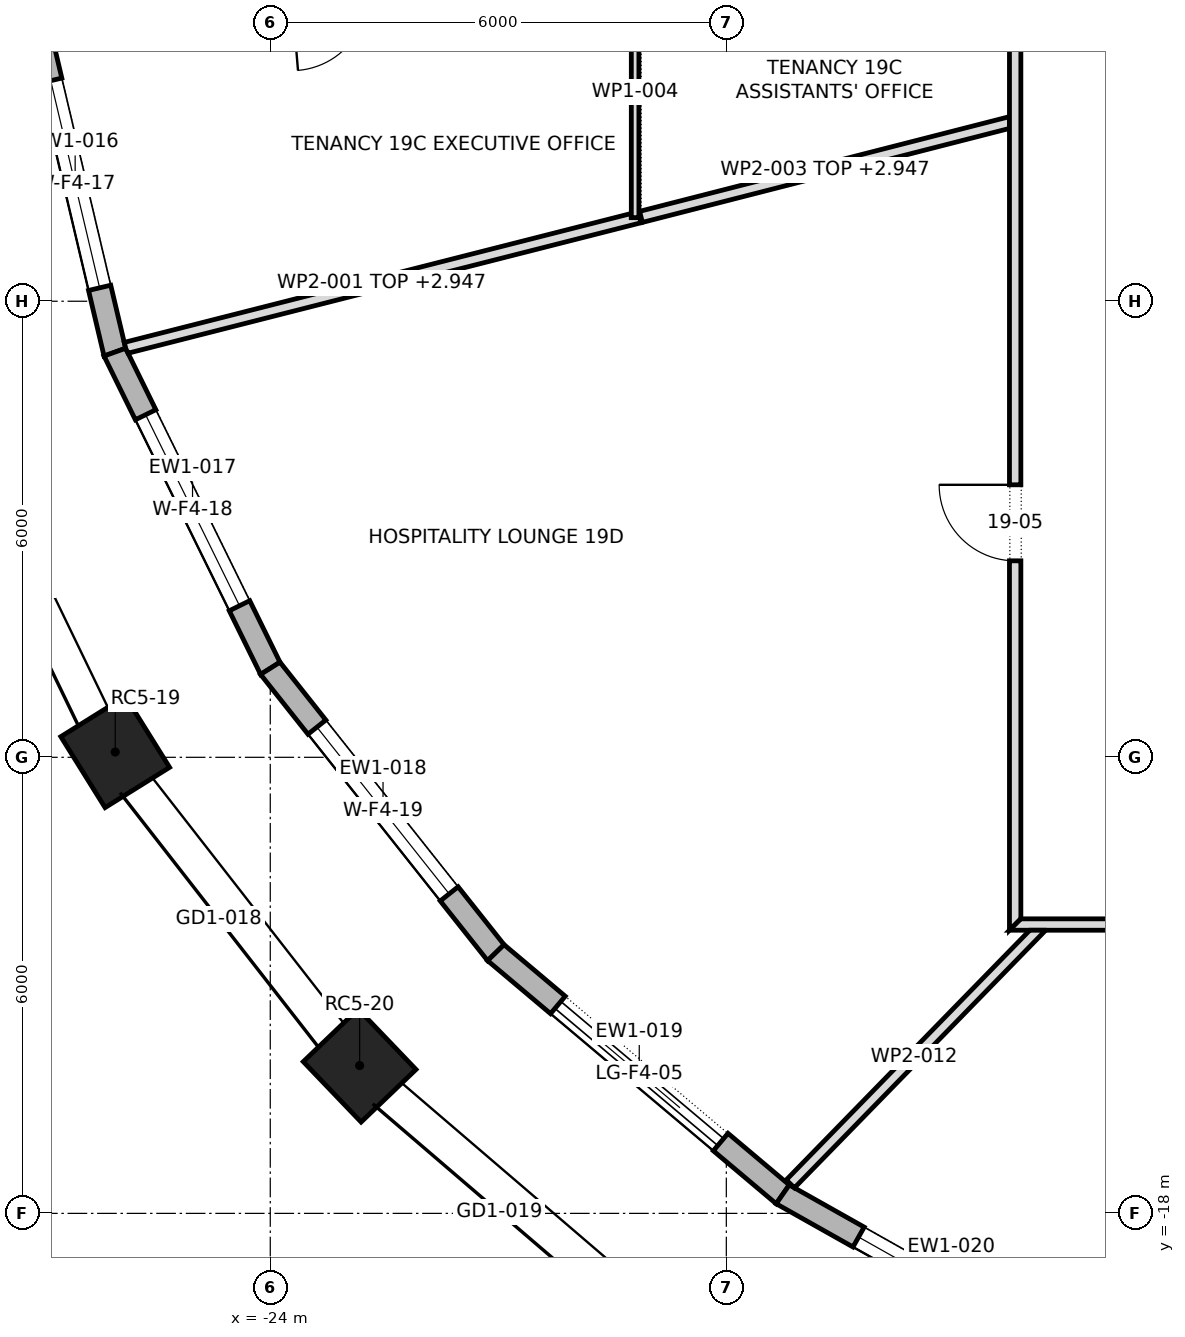
"""IFC4 building model, lengths in metres.
Left out: names, types, materials, properties, quantities, classifications, styles, units other than length and angle.
Written with IfcOpenShell. Run it as: python <this file> out.ifc"""

import sys

from ifc_helpers import new_model, si_unit, direction, frame, frame_2d, origin, origin_2d, place, context, subcontext, project, spatial, polyline, rectangle, outline, extrude, element, fill, save


model = new_model("IFC4")
c1 = context("Model", 3, precision=1e-05, world=origin(), true_north=direction((0.0, 1.0)))
c2 = subcontext(c1, "Body", "Model", "MODEL_VIEW")
j1 = project(units=[si_unit("LENGTHUNIT", "METRE"), si_unit("PLANEANGLEUNIT", "RADIAN")], contexts=[c1])
p1 = place(None, origin())
s1 = spatial("IfcSite", under=j1, at=p1, CompositionType="ELEMENT")
p2 = place(p1, origin())
s2 = spatial("IfcBuilding", under=s1, at=p2, CompositionType="ELEMENT")
p3 = place(p2, frame((0.0, 0.0, 276.3)))
s3 = spatial("IfcBuildingStorey", under=s2, at=p3, CompositionType="ELEMENT", Elevation=276.3)
for number, where, z_axis, x_axis in (
    (1, (-26.04, -11.93, 0.0), (0.0, 0.0, 1.0), (0.529, -0.849, 0.0)),
    (2, (-22.824, -16.055, 0.0), (0.0, 0.0, 1.0), (0.692, -0.722, 0.0)),
):
    element("IfcColumn", number, at=place(p3, frame(where, z_axis=z_axis, x_axis=x_axis)), inside=s3, PredefinedType="COLUMN", context=c2, shape_type="SweptSolid", body=[
        extrude(rectangle(XDim=1.1, YDim=1.0, at=origin_2d()), origin(), (0.0, 0.0, 1.0), 4.0),
    ])
p4 = place(p3, frame((-27.088, -2.252, 0.0), z_axis=(0.0, 0.0, 1.0), x_axis=(0.22983372436, -0.973229910734, 0.0)))
e3 = element("IfcWall", 3, at=p4, inside=s3, PredefinedType="STANDARD", context=c2, shape_type="SweptSolid", body=[
    extrude(outline(polyline([(-0.018, -0.15), (4.556, -0.15), (4.522, 0.15), (0.018, 0.15), (-0.018, -0.15)])), origin(), (0.0, 0.0, 1.0), 3.7),
])
p5 = place(p4, frame((0.869, 0.0, 0.6)))
e4 = element("IfcOpeningElement", 4, at=p5, cuts=e3, PredefinedType="OPENING", context=c2, shape_type="SweptSolid", body=[
    extrude(rectangle(XDim=2.8, YDim=2.65, at=frame_2d((1.4, 1.325))), frame((0.0, 0.162, 0.0), z_axis=(0.0, -1.0, 0.0), x_axis=(1.0, 0.0, 0.0)), (0.0, 0.0, 1.0), 0.324),
])
p6 = place(p3, frame((-26.045, -6.67, 0.0), z_axis=(0.0, 0.0, 1.0), x_axis=(0.441261940724, -0.897378348117, 0.0)))
e5 = element("IfcWall", 5, at=p6, inside=s3, PredefinedType="STANDARD", context=c2, shape_type="SweptSolid", body=[
    extrude(outline(polyline([(-0.017, -0.15), (4.651, -0.15), (4.619, 0.15), (0.017, 0.15), (-0.017, -0.15)])), origin(), (0.0, 0.0, 1.0), 3.7),
])
p7 = place(p6, frame((0.917, 0.0, 0.6)))
e6 = element("IfcOpeningElement", 6, at=p7, cuts=e5, PredefinedType="OPENING", context=c2, shape_type="SweptSolid", body=[
    extrude(rectangle(XDim=2.8, YDim=2.65, at=frame_2d((1.4, 1.325))), frame((0.0, 0.162, 0.0), z_axis=(0.0, -1.0, 0.0), x_axis=(1.0, 0.0, 0.0)), (0.0, 0.0, 1.0), 0.324),
])
p8 = place(p3, frame((-24.0, -10.829, 0.0), z_axis=(0.0, 0.0, 1.0), x_axis=(0.621434755851, -0.783465917715, 0.0)))
e7 = element("IfcWall", 7, at=p8, inside=s3, PredefinedType="STANDARD", context=c2, shape_type="SweptSolid", body=[
    extrude(outline(polyline([(-0.016, -0.15), (4.79, -0.15), (4.76, 0.15), (0.016, 0.15), (-0.016, -0.15)])), origin(), (0.0, 0.0, 1.0), 3.7),
])
p9 = place(p8, frame((0.987, 0.0, 0.6)))
e8 = element("IfcOpeningElement", 8, at=p9, cuts=e7, PredefinedType="OPENING", context=c2, shape_type="SweptSolid", body=[
    extrude(rectangle(XDim=2.8, YDim=2.65, at=frame_2d((1.4, 1.325))), frame((0.0, 0.162, 0.0), z_axis=(0.0, -1.0, 0.0), x_axis=(1.0, 0.0, 0.0)), (0.0, 0.0, 1.0), 0.324),
])
p10 = place(p3, frame((-21.032, -14.57, 0.0), z_axis=(0.0, 0.0, 1.0), x_axis=(0.764832940795, -0.644228664897, 0.0)))
e9 = element("IfcWall", 9, at=p10, inside=s3, PredefinedType="STANDARD", context=c2, shape_type="SweptSolid", body=[
    extrude(outline(polyline([(-0.015, -0.15), (4.949, -0.15), (4.921, 0.15), (0.015, 0.15), (-0.015, -0.15)])), origin(), (0.0, 0.0, 1.0), 3.7),
])
p11 = place(p10, frame((1.068, 0.0, 0.0)))
e10 = element("IfcOpeningElement", 10, at=p11, cuts=e9, PredefinedType="OPENING", context=c2, shape_type="SweptSolid", body=[
    extrude(rectangle(XDim=2.8, YDim=3.25, at=frame_2d((1.4, 1.625))), frame((0.0, 0.162, 0.0), z_axis=(0.0, -1.0, 0.0), x_axis=(1.0, 0.0, 0.0)), (0.0, 0.0, 1.0), 0.324),
])
p12 = place(p3, frame((-17.258, -17.75, 0.0), z_axis=(0.0, 0.0, 1.0), x_axis=(0.871433320402, -0.490513983585, 0.0)))
e11 = element("IfcWall", 11, at=p12, inside=s3, PredefinedType="STANDARD", context=c2, shape_type="SweptSolid", body=[
    extrude(outline(polyline([(-0.014, -0.15), (5.104, -0.15), (5.077, 0.15), (0.014, 0.15), (-0.014, -0.15)])), origin(), (0.0, 0.0, 1.0), 3.7),
])
p13 = place(p12, frame((1.145, 0.0, 0.6)))
e12 = element("IfcOpeningElement", 12, at=p13, cuts=e11, PredefinedType="OPENING", context=c2, shape_type="SweptSolid", body=[
    extrude(rectangle(XDim=2.8, YDim=2.65, at=frame_2d((1.4, 1.325))), frame((0.0, 0.162, 0.0), z_axis=(0.0, -1.0, 0.0), x_axis=(1.0, 0.0, 0.0)), (0.0, 0.0, 1.0), 0.324),
])
p14 = place(p3, frame((-25.902, -6.614, 0.0), z_axis=(0.0, 0.0, 1.0), x_axis=(0.969153959709, 0.246456086108, 0.0)))
e13 = element("IfcWall", 13, at=p14, inside=s3, PredefinedType="PARTITIONING", context=c2, shape_type="SweptSolid", body=[
    extrude(outline(polyline([(0.013, -0.075), (1.756, -0.075), (3.5, -0.075), (5.243, -0.075), (6.986, -0.075), (6.986, 0.072), (6.967, -0.003), (6.87, 0.022), (6.883, 0.075), (5.162, 0.075), (3.442, 0.075), (1.721, 0.075), (0.0, 0.075), (0.0, -0.012), (0.013, -0.075)])), origin(), (0.0, 0.0, 1.0), 2.947),
])
p15 = place(p3, frame((-19.132, -4.893, 0.0), z_axis=(0.0, 0.0, 1.0), x_axis=(0.968763144659, 0.247987841537, 0.0)))
e14 = element("IfcWall", 14, at=p15, inside=s3, PredefinedType="PARTITIONING", context=c2, shape_type="SweptSolid", body=[
    extrude(outline(polyline([(0.0, -0.075), (1.665, -0.075), (3.33, -0.075), (4.994, -0.075), (5.033, 0.074), (5.033, 0.075), (3.355, 0.075), (1.678, 0.075), (0.001, 0.075), (0.0, 0.072), (0.0, -0.075)])), origin(), (0.0, 0.0, 1.0), 2.947),
])
p16 = place(p3, frame((-19.2, -4.9, 0.0), z_axis=(0.0, 0.0, 1.0), x_axis=(0.0, 1.0, 0.0)))
e15 = element("IfcWall", 15, at=p16, inside=s3, PredefinedType="PARTITIONING", context=c2, shape_type="SweptSolid", body=[
    extrude(rectangle(XDim=3.31, YDim=0.1, at=frame_2d((1.655, 0.0))), origin(), (0.0, 0.0, 1.0), 3.7),
])
p17 = place(p3, frame((-14.2, -14.275, 0.0), z_axis=(0.0, 0.0, 1.0), x_axis=(0.0, 1.0, 0.0)))
e16 = element("IfcWall", 16, at=p17, inside=s3, PredefinedType="PARTITIONING", context=c2, shape_type="SweptSolid", body=[
    extrude(outline(polyline([(0.15, -0.075), (2.033, -0.075), (3.917, -0.075), (5.8, -0.075), (7.683, -0.075), (9.567, -0.075), (11.45, -0.075), (13.333, -0.075), (15.217, -0.075), (17.1, -0.075), (18.983, -0.075), (20.866, -0.075), (22.75, -0.075), (24.633, -0.075), (26.517, -0.075), (28.4, -0.075), (28.55, 0.075), (28.55, 0.075), (26.646, 0.075), (24.743, 0.075), (22.84, 0.075), (20.937, 0.075), (19.033, 0.075), (17.13, 0.075), (15.227, 0.075), (13.323, 0.075), (11.42, 0.075), (9.517, 0.075), (7.613, 0.075), (5.71, 0.075), (3.807, 0.075), (1.903, 0.075), (0.0, 0.075), (0.15, -0.075)])), origin(), (0.0, 0.0, 1.0), 3.7),
])
p18 = place(p17, frame((20.5, 0.0, 0.0)))
e17 = element("IfcOpeningElement", 17, at=p18, cuts=e16, PredefinedType="OPENING", context=c2, shape_type="SweptSolid", body=[
    extrude(rectangle(XDim=1.0, YDim=2.1, at=frame_2d((0.5, 1.05))), frame((0.0, 0.087, 0.0), z_axis=(0.0, -1.0, 0.0), x_axis=(1.0, 0.0, 0.0)), (0.0, 0.0, 1.0), 0.174),
])
p19 = place(p17, frame((11.595, 0.0, 0.0)))
e18 = element("IfcOpeningElement", 18, at=p19, cuts=e16, PredefinedType="OPENING", context=c2, shape_type="SweptSolid", body=[
    extrude(rectangle(XDim=1.0, YDim=2.1, at=frame_2d((0.5, 1.05))), frame((0.0, 0.087, 0.0), z_axis=(0.0, -1.0, 0.0), x_axis=(1.0, 0.0, 0.0)), (0.0, 0.0, 1.0), 0.174),
])
p20 = place(p17, frame((15.225, 0.0, 0.0)))
e19 = element("IfcOpeningElement", 19, at=p20, cuts=e16, PredefinedType="OPENING", context=c2, shape_type="SweptSolid", body=[
    extrude(rectangle(XDim=1.0, YDim=2.1, at=frame_2d((0.5, 1.05))), frame((0.0, 0.087, 0.0), z_axis=(0.0, -1.0, 0.0), x_axis=(1.0, 0.0, 0.0)), (0.0, 0.0, 1.0), 0.174),
])
p21 = place(p17, frame((4.86, 0.0, 0.0)))
e20 = element("IfcOpeningElement", 20, at=p21, cuts=e16, PredefinedType="OPENING", context=c2, shape_type="SweptSolid", body=[
    extrude(rectangle(XDim=1.0, YDim=2.1, at=frame_2d((0.5, 1.05))), frame((0.0, 0.087, 0.0), z_axis=(0.0, -1.0, 0.0), x_axis=(1.0, 0.0, 0.0)), (0.0, 0.0, 1.0), 0.174),
])
p22 = place(p3, frame((-14.275, -14.2, 0.0), z_axis=(0.0, 0.0, 1.0), x_axis=(1.0, 0.0, 0.0)))
e21 = element("IfcWall", 21, at=p22, inside=s3, PredefinedType="PARTITIONING", context=c2, shape_type="SweptSolid", body=[
    extrude(outline(polyline([(28.55, -0.075), (28.55, -0.075), (28.4, 0.075), (26.517, 0.075), (24.633, 0.075), (22.75, 0.075), (20.866, 0.075), (18.983, 0.075), (17.1, 0.075), (15.217, 0.075), (13.333, 0.075), (11.45, 0.075), (9.567, 0.075), (7.683, 0.075), (5.8, 0.075), (3.917, 0.075), (2.033, 0.075), (0.15, 0.075), (0.0, -0.075), (1.903, -0.075), (3.807, -0.075), (5.71, -0.075), (7.613, -0.075), (9.517, -0.075), (11.42, -0.075), (13.323, -0.075), (15.227, -0.075), (17.13, -0.075), (19.033, -0.075), (20.937, -0.075), (22.84, -0.075), (24.743, -0.075), (26.646, -0.075), (28.55, -0.075)])), origin(), (0.0, 0.0, 1.0), 3.7),
])
p23 = place(p22, frame((4.305, 0.0, 0.0)))
e22 = element("IfcOpeningElement", 22, at=p23, cuts=e21, PredefinedType="OPENING", context=c2, shape_type="SweptSolid", body=[
    extrude(rectangle(XDim=1.0, YDim=2.1, at=frame_2d((0.5, 1.05))), frame((0.0, 0.087, 0.0), z_axis=(0.0, -1.0, 0.0), x_axis=(1.0, 0.0, 0.0)), (0.0, 0.0, 1.0), 0.174),
])
p24 = place(p22, frame((17.735, 0.0, 0.0)))
e23 = element("IfcOpeningElement", 23, at=p24, cuts=e21, PredefinedType="OPENING", context=c2, shape_type="SweptSolid", body=[
    extrude(rectangle(XDim=1.8, YDim=2.1, at=frame_2d((0.9, 1.05))), frame((0.0, 0.087, 0.0), z_axis=(0.0, -1.0, 0.0), x_axis=(1.0, 0.0, 0.0)), (0.0, 0.0, 1.0), 0.174),
])
p25 = place(p3, frame((-13.852, -14.223, 0.0), z_axis=(0.0, 0.0, 1.0), x_axis=(-0.69820654799, -0.715896372629, 0.0)))
e24 = element("IfcWall", 24, at=p25, inside=s3, PredefinedType="PARTITIONING", context=c2, shape_type="SweptSolid", body=[
    extrude(outline(polyline([(4.734, -0.075), (4.734, 0.075), (4.734, 0.075), (3.156, 0.075), (1.578, 0.075), (0.0, 0.075), (0.0, 0.075), (0.146, -0.075), (1.675, -0.075), (3.205, -0.075), (4.734, -0.075)])), origin(), (0.0, 0.0, 1.0), 3.7),
])
p26 = place(p5, origin())
e25 = element("IfcWindow", 25, at=p26, inside=s3, PartitioningType="DOUBLE_PANEL_VERTICAL", PredefinedType="WINDOW", context=c2, shape_type="SweptSolid", body=[
    extrude(rectangle(XDim=2.8, YDim=2.65, at=frame_2d((1.4, 1.325))), frame((0.0, 0.03, 0.0), z_axis=(0.0, -1.0, 0.0), x_axis=(1.0, 0.0, 0.0)), (0.0, 0.0, 1.0), 0.06),
])
fill(e4, e25)
p27 = place(p7, origin())
e26 = element("IfcWindow", 26, at=p27, inside=s3, PartitioningType="DOUBLE_PANEL_VERTICAL", PredefinedType="WINDOW", context=c2, shape_type="SweptSolid", body=[
    extrude(rectangle(XDim=2.8, YDim=2.65, at=frame_2d((1.4, 1.325))), frame((0.0, 0.03, 0.0), z_axis=(0.0, -1.0, 0.0), x_axis=(1.0, 0.0, 0.0)), (0.0, 0.0, 1.0), 0.06),
])
fill(e6, e26)
p28 = place(p9, origin())
e27 = element("IfcWindow", 27, at=p28, inside=s3, PartitioningType="DOUBLE_PANEL_VERTICAL", PredefinedType="WINDOW", context=c2, shape_type="SweptSolid", body=[
    extrude(rectangle(XDim=2.8, YDim=2.65, at=frame_2d((1.4, 1.325))), frame((0.0, 0.03, 0.0), z_axis=(0.0, -1.0, 0.0), x_axis=(1.0, 0.0, 0.0)), (0.0, 0.0, 1.0), 0.06),
])
fill(e8, e27)
p29 = place(p11, origin())
e28 = element("IfcDoor", 28, at=p29, inside=s3, OperationType="DOUBLE_DOOR_SLIDING", PredefinedType="DOOR", context=c2, shape_type="SweptSolid", body=[
    extrude(rectangle(XDim=2.8, YDim=3.25, at=frame_2d((1.4, 1.625))), frame((0.0, 0.025, 0.0), z_axis=(0.0, -1.0, 0.0), x_axis=(1.0, 0.0, 0.0)), (0.0, 0.0, 1.0), 0.05),
])
fill(e10, e28)
p30 = place(p13, origin())
e29 = element("IfcWindow", 29, at=p30, inside=s3, PartitioningType="DOUBLE_PANEL_VERTICAL", PredefinedType="WINDOW", context=c2, shape_type="SweptSolid", body=[
    extrude(rectangle(XDim=2.8, YDim=2.65, at=frame_2d((1.4, 1.325))), frame((0.0, 0.03, 0.0), z_axis=(0.0, -1.0, 0.0), x_axis=(1.0, 0.0, 0.0)), (0.0, 0.0, 1.0), 0.06),
])
fill(e12, e29)
p31 = place(p21, origin())
e30 = element("IfcDoor", 30, at=p31, inside=s3, OperationType="SINGLE_SWING_LEFT", PredefinedType="DOOR", context=c2, shape_type="SweptSolid", body=[
    extrude(rectangle(XDim=1.0, YDim=2.1, at=frame_2d((0.5, 1.05))), frame((0.0, 0.025, 0.0), z_axis=(0.0, -1.0, 0.0), x_axis=(1.0, 0.0, 0.0)), (0.0, 0.0, 1.0), 0.05),
])
fill(e20, e30)
save(model, sys.argv[1])
